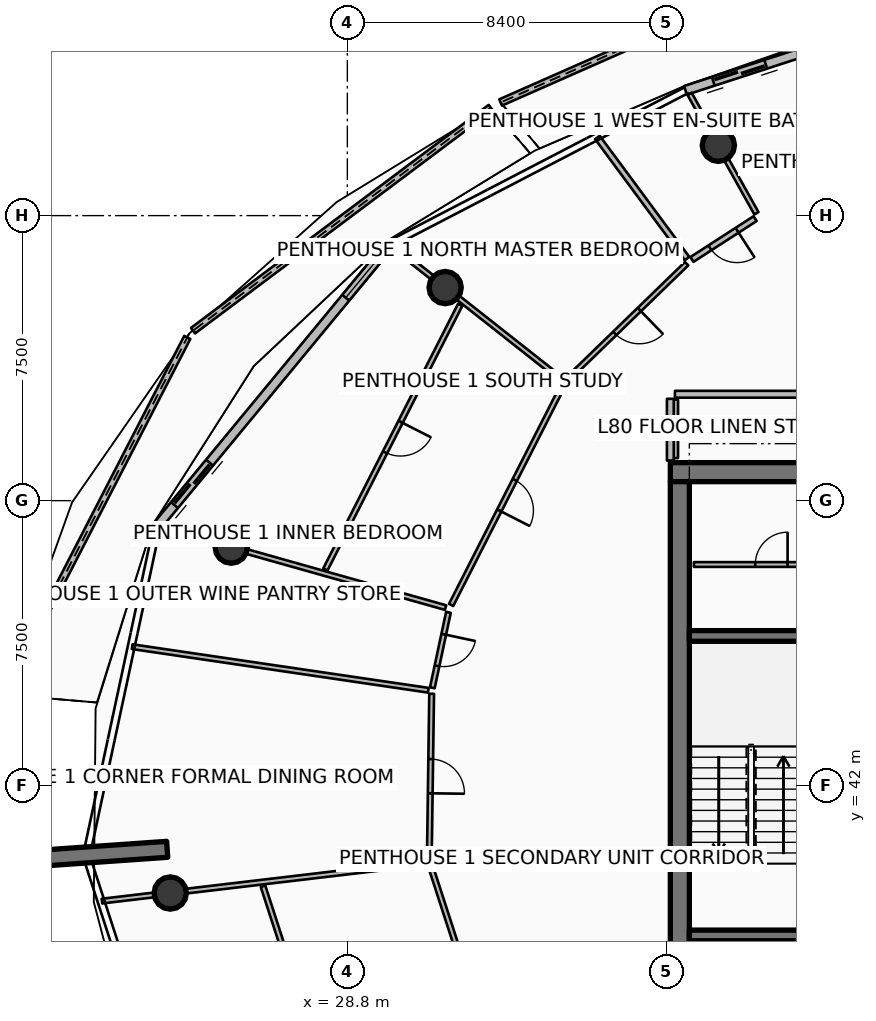
"""IFC4 building model, lengths in metres.
Left out: names, types, materials, properties, quantities, classifications, styles, units other than length and angle.
Written with IfcOpenShell. Run it as: python <this file> out.ifc"""

import sys

from ifc_helpers import new_model, si_unit, direction, frame, frame_2d, origin, origin_2d, place, context, subcontext, project, spatial, polyline, rectangle, circle, outline, extrude, element, fill, save


model = new_model("IFC4")
c1 = context("Model", 3, precision=1e-05, world=origin(), true_north=direction((0.0, 1.0)))
c2 = subcontext(c1, "Body", "Model", "MODEL_VIEW")
j1 = project(units=[si_unit("LENGTHUNIT", "METRE"), si_unit("PLANEANGLEUNIT", "RADIAN")], contexts=[c1])
p1 = place(None, origin())
s1 = spatial("IfcSite", under=j1, at=p1, CompositionType="ELEMENT")
p2 = place(p1, origin())
s2 = spatial("IfcBuilding", under=s1, at=p2, CompositionType="ELEMENT")
p3 = place(p2, frame((0.0, 0.0, 317.9)))
s3 = spatial("IfcBuildingStorey", under=s2, at=p3, CompositionType="ELEMENT", Elevation=317.9)
p4 = place(p3, frame((37.3, 50.25, 0.0), z_axis=(0.0, 0.0, 1.0), x_axis=(1.0, 0.0, 0.0)))
e1 = element("IfcWall", 1, at=p4, inside=s3, PredefinedType="SHEAR", context=c2, shape_type="SweptSolid", body=[
    extrude(rectangle(XDim=9.6, YDim=0.5, at=frame_2d((4.8, 0.0))), origin(), (0.0, 0.0, 1.0), 4.2),
])
p5 = place(p3, frame((37.55, 34.0, 0.0), z_axis=(0.0, 0.0, 1.0), x_axis=(0.0, 1.0, 0.0)))
e2 = element("IfcWall", 2, at=p5, inside=s3, PredefinedType="SHEAR", context=c2, shape_type="SweptSolid", body=[
    extrude(rectangle(XDim=16.0, YDim=0.5, at=frame_2d((8.0, 0.0))), origin(), (0.0, 0.0, 1.0), 4.2),
])
for number, where, z_axis, x_axis in (
    (3, (37.8, 38.06, 0.0), (0.0, 0.0, 1.0), (1.0, 0.0, 0.0)),
    (4, (37.8, 45.94, 0.0), (0.0, 0.0, 1.0), (1.0, 0.0, 0.0)),
):
    element("IfcWall", number, at=place(p3, frame(where, z_axis=z_axis, x_axis=x_axis)), inside=s3, PredefinedType="SHEAR", context=c2, shape_type="SweptSolid", body=[
        extrude(rectangle(XDim=3.5, YDim=0.28, at=frame_2d((1.75, 0.0))), origin(), (0.0, 0.0, 1.0), 4.2),
    ])
p6 = place(p3, frame((24.059, 40.326, 0.0), z_axis=(0.0, 0.0, 1.0), x_axis=(-0.997564163539, -0.069754853754, 0.0)))
e5 = element("IfcWall", 5, at=p6, inside=s3, PredefinedType="SOLIDWALL", context=c2, shape_type="SweptSolid", body=[
    extrude(rectangle(XDim=3.5, YDim=0.42, at=frame_2d((1.75, 0.0))), origin(), (0.0, 0.0, 1.0), 4.2),
])
for number, where, z_axis, x_axis in (
    (6, (38.563, 58.851, 0.0), (0.0, 0.0, 1.0), (1.0, 0.0, 0.0)),
    (7, (31.374, 55.107, 0.0), (0.0, 0.0, 1.0), (1.0, 0.0, 0.0)),
    (8, (25.744, 48.277, 0.0), (0.0, 0.0, 1.0), (1.0, 0.0, 0.0)),
    (9, (24.14, 39.176, 0.0), (0.0, 0.0, 1.0), (1.0, 0.0, 0.0)),
):
    element("IfcColumn", number, at=place(p3, frame(where, z_axis=z_axis, x_axis=x_axis)), inside=s3, PredefinedType="COLUMN", context=c2, shape_type="SweptSolid", body=[
        extrude(circle(Radius=0.425, at=origin_2d()), origin(), (0.0, 0.0, 1.0), 3.94),
    ])
p7 = place(p3, frame((40.879, 63.529, 0.0), z_axis=(0.0, 0.0, 1.0), x_axis=(-0.914812827608, -0.403878063831, 0.0)))
e10 = element("IfcWall", 10, at=p7, inside=s3, PredefinedType="PARAPET", context=c2, shape_type="SweptSolid", body=[
    extrude(outline(polyline([(0.0, 0.0), (8.793, 0.0), (8.794, 1.12), (4.397, 1.182), (0.0, 1.348), (0.0, 0.0)])), frame((0.0, 0.09, 0.0), z_axis=(0.0, -1.0, 0.0), x_axis=(1.0, 0.0, 0.0)), (0.0, 0.0, 1.0), 0.18),
])
p8 = place(p3, frame((32.573, 59.841, 0.0), z_axis=(0.0, 0.0, 1.0), x_axis=(-0.800350065213, -0.599532962491, 0.0)))
e11 = element("IfcWall", 11, at=p8, inside=s3, PredefinedType="PARAPET", context=c2, shape_type="SweptSolid", body=[
    extrude(outline(polyline([(0.0, 0.0), (9.788, 0.0), (9.788, 1.348), (4.894, 1.182), (0.0, 1.12), (0.0, 0.0)])), frame((0.0, 0.09, 0.0), z_axis=(0.0, -1.0, 0.0), x_axis=(1.0, 0.0, 0.0)), (0.0, 0.0, 1.0), 0.18),
])
p9 = place(p3, frame((24.588, 53.794, 0.0), z_axis=(0.0, 0.0, 1.0), x_axis=(-0.458492338696, -0.888698360163, 0.0)))
e12 = element("IfcWall", 12, at=p9, inside=s3, PredefinedType="PARAPET", context=c2, shape_type="SweptSolid", body=[
    extrude(outline(polyline([(0.0, 0.0), (10.573, 0.0), (10.573, 1.747), (5.287, 1.562), (0.0, 1.348), (0.0, 0.0)])), frame((0.0, 0.09, 0.0), z_axis=(0.0, -1.0, 0.0), x_axis=(1.0, 0.0, 0.0)), (0.0, 0.0, 1.0), 0.18),
])
p10 = place(p3, frame((45.581, 62.857, 0.0), z_axis=(0.0, 0.0, 1.0), x_axis=(-0.951053547111, -0.309026132434, 0.0)))
e13 = element("IfcWall", 13, at=p10, inside=s3, PredefinedType="SOLIDWALL", context=c2, shape_type="SweptSolid", body=[
    extrude(rectangle(XDim=8.289, YDim=0.24, at=frame_2d((4.145, 0.0))), origin(), (0.0, 0.0, 1.0), 2.89),
])
p11 = place(p10, frame((6.069, 0.0, 0.0)))
e14 = element("IfcOpeningElement", 14, at=p11, cuts=e13, PredefinedType="OPENING", context=c2, shape_type="SweptSolid", body=[
    extrude(rectangle(XDim=1.45, YDim=2.15, at=frame_2d((0.725, 1.075))), frame((0.0, 0.13, 0.0), z_axis=(0.0, -1.0, 0.0), x_axis=(1.0, 0.0, 0.0)), (0.0, 0.0, 1.0), 0.26),
])
p12 = place(p10, frame((0.28, 0.0, 0.65)))
e15 = element("IfcOpeningElement", 15, at=p12, cuts=e13, PredefinedType="OPENING", context=c2, shape_type="SweptSolid", body=[
    extrude(rectangle(XDim=1.6, YDim=1.5, at=frame_2d((0.8, 0.75))), frame((0.0, 0.13, 0.0), z_axis=(0.0, -1.0, 0.0), x_axis=(1.0, 0.0, 0.0)), (0.0, 0.0, 1.0), 0.26),
])
p13 = place(p3, frame((29.955, 56.289, 0.0), z_axis=(0.0, 0.0, 1.0), x_axis=(-0.636803612721, -0.771026042897, 0.0)))
e16 = element("IfcWall", 16, at=p13, inside=s3, PredefinedType="SOLIDWALL", context=c2, shape_type="SweptSolid", body=[
    extrude(rectangle(XDim=9.728, YDim=0.24, at=frame_2d((4.864, 0.0))), origin(), (0.0, 0.0, 1.0), 2.89),
])
p14 = place(p13, frame((7.508, 0.0, 0.0)))
e17 = element("IfcOpeningElement", 17, at=p14, cuts=e16, PredefinedType="OPENING", context=c2, shape_type="SweptSolid", body=[
    extrude(rectangle(XDim=1.45, YDim=2.15, at=frame_2d((0.725, 1.075))), frame((0.0, 0.13, 0.0), z_axis=(0.0, -1.0, 0.0), x_axis=(1.0, 0.0, 0.0)), (0.0, 0.0, 1.0), 0.26),
])
p15 = place(p13, frame((0.28, 0.0, 0.65)))
e18 = element("IfcOpeningElement", 18, at=p15, cuts=e16, PredefinedType="OPENING", context=c2, shape_type="SweptSolid", body=[
    extrude(rectangle(XDim=1.6, YDim=1.5, at=frame_2d((0.8, 0.75))), frame((0.0, 0.13, 0.0), z_axis=(0.0, -1.0, 0.0), x_axis=(1.0, 0.0, 0.0)), (0.0, 0.0, 1.0), 0.26),
])
p16 = place(p3, frame((37.92, 47.82, 0.0), z_axis=(0.0, 0.0, 1.0), x_axis=(1.0, 0.0, 0.0)))
e19 = element("IfcWall", 19, at=p16, inside=s3, PredefinedType="PARTITIONING", context=c2, shape_type="SweptSolid", body=[
    extrude(rectangle(XDim=4.08, YDim=0.125, at=frame_2d((2.04, 0.0))), origin(), (0.0, 0.0, 1.0), 3.38),
])
p17 = place(p16, frame((1.615, 0.0, 0.0)))
e20 = element("IfcOpeningElement", 20, at=p17, cuts=e19, PredefinedType="OPENING", context=c2, shape_type="SweptSolid", body=[
    extrude(rectangle(XDim=0.85, YDim=2.06, at=frame_2d((0.425, 1.03))), frame((0.0, 0.073, 0.0), z_axis=(0.0, -1.0, 0.0), x_axis=(1.0, 0.0, 0.0)), (0.0, 0.0, 1.0), 0.145),
])
p18 = place(p3, frame((37.44, 50.62, 0.0), z_axis=(0.0, 0.0, 1.0), x_axis=(0.0, 1.0, 0.0)))
e21 = element("IfcWall", 21, at=p18, inside=s3, PredefinedType="PARTITIONING", context=c2, shape_type="SweptSolid", body=[
    extrude(rectangle(XDim=1.54, YDim=0.125, at=frame_2d((0.77, 0.0))), origin(), (0.0, 0.0, 1.0), 3.38),
])
p19 = place(p3, frame((42.112, 52.3, 0.0), z_axis=(0.0, 0.0, 1.0), x_axis=(-1.0, 0.0, 0.0)))
e22 = element("IfcWall", 22, at=p19, inside=s3, PredefinedType="PARTITIONING", context=c2, shape_type="SweptSolid", body=[
    extrude(rectangle(XDim=4.692, YDim=0.18, at=frame_2d((2.346, 0.0))), origin(), (0.0, 0.0, 1.0), 3.38),
])
p20 = place(p3, frame((37.3, 52.18, 0.0), z_axis=(0.0, 0.0, 1.0), x_axis=(0.0, -1.0, 0.0)))
e23 = element("IfcWall", 23, at=p20, inside=s3, PredefinedType="PARTITIONING", context=c2, shape_type="SweptSolid", body=[
    extrude(rectangle(XDim=1.625, YDim=0.18, at=frame_2d((0.812, 0.0))), origin(), (0.0, 0.0, 1.0), 3.38),
])
p21 = place(p3, frame((39.565, 57.062, 0.0), z_axis=(0.0, 0.0, 1.0), x_axis=(-0.488617828282, 0.872497918556, 0.0)))
e24 = element("IfcWall", 24, at=p21, inside=s3, PredefinedType="PARTITIONING", context=c2, shape_type="SweptSolid", body=[
    extrude(rectangle(XDim=3.599, YDim=0.125, at=frame_2d((1.8, 0.0))), origin(), (0.0, 0.0, 1.0), 3.38),
])
p22 = place(p3, frame((39.53, 56.92, 0.0), z_axis=(0.0, 0.0, 1.0), x_axis=(-0.839824942878, -0.542857315802, 0.0)))
e25 = element("IfcWall", 25, at=p22, inside=s3, PredefinedType="PARTITIONING", context=c2, shape_type="SweptSolid", body=[
    extrude(rectangle(XDim=1.979, YDim=0.15, at=frame_2d((0.989, 0.0))), origin(), (0.0, 0.0, 1.0), 3.38),
])
p23 = place(p22, frame((0.564, 0.0, 0.0)))
e26 = element("IfcOpeningElement", 26, at=p23, cuts=e25, PredefinedType="OPENING", context=c2, shape_type="SweptSolid", body=[
    extrude(rectangle(XDim=0.85, YDim=2.06, at=frame_2d((0.425, 1.03))), frame((0.0, 0.085, 0.0), z_axis=(0.0, -1.0, 0.0), x_axis=(1.0, 0.0, 0.0)), (0.0, 0.0, 1.0), 0.17),
])
p24 = place(p3, frame((37.739, 55.87, 0.0), z_axis=(0.0, 0.0, 1.0), x_axis=(-0.594773749171, 0.803893144203, 0.0)))
e27 = element("IfcWall", 27, at=p24, inside=s3, PredefinedType="PARTITIONING", context=c2, shape_type="SweptSolid", body=[
    extrude(rectangle(XDim=3.964, YDim=0.15, at=frame_2d((1.982, 0.0))), origin(), (0.0, 0.0, 1.0), 3.38),
])
p25 = place(p3, frame((37.728, 55.735, 0.0), z_axis=(0.0, 0.0, 1.0), x_axis=(-0.717843655189, -0.696204342636, 0.0)))
e28 = element("IfcWall", 28, at=p25, inside=s3, PredefinedType="PARTITIONING", context=c2, shape_type="SweptSolid", body=[
    extrude(rectangle(XDim=4.366, YDim=0.125, at=frame_2d((2.183, 0.0))), origin(), (0.0, 0.0, 1.0), 3.38),
])
p26 = place(p25, frame((1.733, 0.0, 0.0)))
e29 = element("IfcOpeningElement", 29, at=p26, cuts=e28, PredefinedType="OPENING", context=c2, shape_type="SweptSolid", body=[
    extrude(rectangle(XDim=0.9, YDim=2.08, at=frame_2d((0.45, 1.04))), frame((0.0, 0.073, 0.0), z_axis=(0.0, -1.0, 0.0), x_axis=(1.0, 0.0, 0.0)), (0.0, 0.0, 1.0), 0.145),
])
p27 = place(p3, frame((34.443, 52.688, 0.0), z_axis=(0.0, 0.0, 1.0), x_axis=(-0.785329715116, 0.61907773224, 0.0)))
e30 = element("IfcWall", 30, at=p27, inside=s3, PredefinedType="PARTITIONING", context=c2, shape_type="SweptSolid", body=[
    extrude(rectangle(XDim=5.73, YDim=0.125, at=frame_2d((2.865, 0.0))), origin(), (0.0, 0.0, 1.0), 3.38),
])
p28 = place(p3, frame((34.472, 52.528, 0.0), z_axis=(0.0, 0.0, 1.0), x_axis=(-0.453985634683, -0.891009003042, 0.0)))
e31 = element("IfcWall", 31, at=p28, inside=s3, PredefinedType="PARTITIONING", context=c2, shape_type="SweptSolid", body=[
    extrude(rectangle(XDim=6.477, YDim=0.125, at=frame_2d((3.238, 0.0))), origin(), (0.0, 0.0, 1.0), 3.38),
])
p29 = place(p28, frame((2.788, 0.0, 0.0)))
e32 = element("IfcOpeningElement", 32, at=p29, cuts=e31, PredefinedType="OPENING", context=c2, shape_type="SweptSolid", body=[
    extrude(rectangle(XDim=0.9, YDim=2.08, at=frame_2d((0.45, 1.04))), frame((0.0, 0.073, 0.0), z_axis=(0.0, -1.0, 0.0), x_axis=(1.0, 0.0, 0.0)), (0.0, 0.0, 1.0), 0.145),
])
p30 = place(p3, frame((31.772, 54.656, 0.0), z_axis=(0.0, 0.0, 1.0), x_axis=(-0.453983318952, -0.891010182946, 0.0)))
e33 = element("IfcWall", 33, at=p30, inside=s3, PredefinedType="PARTITIONING", context=c2, shape_type="SweptSolid", body=[
    extrude(rectangle(XDim=7.818, YDim=0.125, at=frame_2d((3.909, 0.0))), origin(), (0.0, 0.0, 1.0), 3.38),
])
p31 = place(p30, frame((3.459, 0.0, 0.0)))
e34 = element("IfcOpeningElement", 34, at=p31, cuts=e33, PredefinedType="OPENING", context=c2, shape_type="SweptSolid", body=[
    extrude(rectangle(XDim=0.9, YDim=2.08, at=frame_2d((0.45, 1.04))), frame((0.0, 0.073, 0.0), z_axis=(0.0, -1.0, 0.0), x_axis=(1.0, 0.0, 0.0)), (0.0, 0.0, 1.0), 0.145),
])
p32 = place(p3, frame((31.385, 46.686, 0.0), z_axis=(0.0, 0.0, 1.0), x_axis=(-0.962455784847, 0.271438505401, 0.0)))
e35 = element("IfcWall", 35, at=p32, inside=s3, PredefinedType="PARTITIONING", context=c2, shape_type="SweptSolid", body=[
    extrude(rectangle(XDim=7.764, YDim=0.125, at=frame_2d((3.882, 0.0))), origin(), (0.0, 0.0, 1.0), 3.38),
])
p33 = place(p3, frame((30.931, 44.511, 0.0), z_axis=(0.0, 0.0, 1.0), x_axis=(-0.989350078836, 0.145555561584, 0.0)))
e36 = element("IfcWall", 36, at=p33, inside=s3, PredefinedType="PARTITIONING", context=c2, shape_type="SweptSolid", body=[
    extrude(rectangle(XDim=7.877, YDim=0.125, at=frame_2d((3.938, 0.0))), origin(), (0.0, 0.0, 1.0), 3.38),
])
p34 = place(p3, frame((31.46, 46.561, 0.0), z_axis=(0.0, 0.0, 1.0), x_axis=(-0.208871695371, -0.977943052981, 0.0)))
e37 = element("IfcWall", 37, at=p34, inside=s3, PredefinedType="PARTITIONING", context=c2, shape_type="SweptSolid", body=[
    extrude(rectangle(XDim=2.029, YDim=0.125, at=frame_2d((1.015, 0.0))), origin(), (0.0, 0.0, 1.0), 3.38),
])
p35 = place(p34, frame((0.59, 0.0, 0.0)))
e38 = element("IfcOpeningElement", 38, at=p35, cuts=e37, PredefinedType="OPENING", context=c2, shape_type="SweptSolid", body=[
    extrude(rectangle(XDim=0.85, YDim=2.06, at=frame_2d((0.425, 1.03))), frame((0.0, 0.073, 0.0), z_axis=(0.0, -1.0, 0.0), x_axis=(1.0, 0.0, 0.0)), (0.0, 0.0, 1.0), 0.145),
])
p36 = place(p3, frame((31.019, 44.418, 0.0), z_axis=(0.0, 0.0, 1.0), x_axis=(-0.014133062898, -0.999900123279, 0.0)))
e39 = element("IfcWall", 39, at=p36, inside=s3, PredefinedType="PARTITIONING", context=c2, shape_type="SweptSolid", body=[
    extrude(rectangle(XDim=4.336, YDim=0.125, at=frame_2d((2.168, 0.0))), origin(), (0.0, 0.0, 1.0), 3.38),
])
p37 = place(p36, frame((1.718, 0.0, 0.0)))
e40 = element("IfcOpeningElement", 40, at=p37, cuts=e39, PredefinedType="OPENING", context=c2, shape_type="SweptSolid", body=[
    extrude(rectangle(XDim=0.9, YDim=2.08, at=frame_2d((0.45, 1.04))), frame((0.0, 0.073, 0.0), z_axis=(0.0, -1.0, 0.0), x_axis=(1.0, 0.0, 0.0)), (0.0, 0.0, 1.0), 0.145),
])
p38 = place(p3, frame((30.857, 39.971, 0.0), z_axis=(0.0, 0.0, 1.0), x_axis=(-0.993069304007, -0.117530240533, 0.0)))
e41 = element("IfcWall", 41, at=p38, inside=s3, PredefinedType="PARTITIONING", context=c2, shape_type="SweptSolid", body=[
    extrude(rectangle(XDim=8.573, YDim=0.125, at=frame_2d((4.286, 0.0))), origin(), (0.0, 0.0, 1.0), 3.38),
])
p39 = place(p3, frame((30.99, 39.878, 0.0), z_axis=(0.0, 0.0, 1.0), x_axis=(0.309026406972, -0.951053457905, 0.0)))
e42 = element("IfcWall", 42, at=p39, inside=s3, PredefinedType="PARTITIONING", context=c2, shape_type="SweptSolid", body=[
    extrude(rectangle(XDim=6.477, YDim=0.125, at=frame_2d((3.238, 0.0))), origin(), (0.0, 0.0, 1.0), 3.38),
])
p40 = place(p39, frame((2.788, 0.0, 0.0)))
e43 = element("IfcOpeningElement", 43, at=p40, cuts=e42, PredefinedType="OPENING", context=c2, shape_type="SweptSolid", body=[
    extrude(rectangle(XDim=0.9, YDim=2.08, at=frame_2d((0.45, 1.04))), frame((0.0, 0.073, 0.0), z_axis=(0.0, -1.0, 0.0), x_axis=(1.0, 0.0, 0.0)), (0.0, 0.0, 1.0), 0.145),
])
p41 = place(p3, frame((26.581, 39.356, 0.0), z_axis=(0.0, 0.0, 1.0), x_axis=(0.309000666789, -0.951061821294, 0.0)))
e44 = element("IfcWall", 44, at=p41, inside=s3, PredefinedType="PARTITIONING", context=c2, shape_type="SweptSolid", body=[
    extrude(rectangle(XDim=8.209, YDim=0.125, at=frame_2d((4.104, 0.0))), origin(), (0.0, 0.0, 1.0), 3.38),
])
p42 = place(p41, frame((3.655, 0.0, 0.0)))
e45 = element("IfcOpeningElement", 45, at=p42, cuts=e44, PredefinedType="OPENING", context=c2, shape_type="SweptSolid", body=[
    extrude(rectangle(XDim=0.9, YDim=2.08, at=frame_2d((0.45, 1.04))), frame((0.0, 0.073, 0.0), z_axis=(0.0, -1.0, 0.0), x_axis=(1.0, 0.0, 0.0)), (0.0, 0.0, 1.0), 0.145),
])
p43 = place(p11, origin())
e46 = element("IfcDoor", 46, at=p43, inside=s3, OperationType="DOUBLE_DOOR_SLIDING", PredefinedType="DOOR", context=c2, shape_type="SweptSolid", body=[
    extrude(rectangle(XDim=1.45, YDim=2.15, at=frame_2d((0.725, 1.075))), frame((0.0, 0.025, 0.0), z_axis=(0.0, -1.0, 0.0), x_axis=(1.0, 0.0, 0.0)), (0.0, 0.0, 1.0), 0.05),
])
fill(e14, e46)
p44 = place(p14, origin())
e47 = element("IfcDoor", 47, at=p44, inside=s3, OperationType="DOUBLE_DOOR_SLIDING", PredefinedType="DOOR", context=c2, shape_type="SweptSolid", body=[
    extrude(rectangle(XDim=1.45, YDim=2.15, at=frame_2d((0.725, 1.075))), frame((0.0, 0.025, 0.0), z_axis=(0.0, -1.0, 0.0), x_axis=(1.0, 0.0, 0.0)), (0.0, 0.0, 1.0), 0.05),
])
fill(e17, e47)
p45 = place(p15, origin())
e48 = element("IfcWindow", 48, at=p45, inside=s3, PartitioningType="SINGLE_PANEL", PredefinedType="WINDOW", context=c2, shape_type="SweptSolid", body=[
    extrude(rectangle(XDim=1.6, YDim=1.5, at=frame_2d((0.8, 0.75))), frame((0.0, 0.03, 0.0), z_axis=(0.0, -1.0, 0.0), x_axis=(1.0, 0.0, 0.0)), (0.0, 0.0, 1.0), 0.06),
])
fill(e18, e48)
p46 = place(p17, origin())
e49 = element("IfcDoor", 49, at=p46, inside=s3, OperationType="SINGLE_SWING_RIGHT", PredefinedType="DOOR", context=c2, shape_type="SweptSolid", body=[
    extrude(rectangle(XDim=0.85, YDim=2.06, at=frame_2d((0.425, 1.03))), frame((0.0, 0.025, 0.0), z_axis=(0.0, -1.0, 0.0), x_axis=(1.0, 0.0, 0.0)), (0.0, 0.0, 1.0), 0.05),
])
fill(e20, e49)
p47 = place(p23, origin())
e50 = element("IfcDoor", 50, at=p47, inside=s3, OperationType="SINGLE_SWING_LEFT", PredefinedType="DOOR", context=c2, shape_type="SweptSolid", body=[
    extrude(rectangle(XDim=0.85, YDim=2.06, at=frame_2d((0.425, 1.03))), frame((0.0, 0.025, 0.0), z_axis=(0.0, -1.0, 0.0), x_axis=(1.0, 0.0, 0.0)), (0.0, 0.0, 1.0), 0.05),
])
fill(e26, e50)
p48 = place(p26, origin())
e51 = element("IfcDoor", 51, at=p48, inside=s3, OperationType="SINGLE_SWING_LEFT", PredefinedType="DOOR", context=c2, shape_type="SweptSolid", body=[
    extrude(rectangle(XDim=0.9, YDim=2.08, at=frame_2d((0.45, 1.04))), frame((0.0, 0.025, 0.0), z_axis=(0.0, -1.0, 0.0), x_axis=(1.0, 0.0, 0.0)), (0.0, 0.0, 1.0), 0.05),
])
fill(e29, e51)
p49 = place(p29, origin())
e52 = element("IfcDoor", 52, at=p49, inside=s3, OperationType="SINGLE_SWING_RIGHT", PredefinedType="DOOR", context=c2, shape_type="SweptSolid", body=[
    extrude(rectangle(XDim=0.9, YDim=2.08, at=frame_2d((0.45, 1.04))), frame((0.0, 0.025, 0.0), z_axis=(0.0, -1.0, 0.0), x_axis=(1.0, 0.0, 0.0)), (0.0, 0.0, 1.0), 0.05),
])
fill(e32, e52)
p50 = place(p31, origin())
e53 = element("IfcDoor", 53, at=p50, inside=s3, OperationType="SINGLE_SWING_LEFT", PredefinedType="DOOR", context=c2, shape_type="SweptSolid", body=[
    extrude(rectangle(XDim=0.9, YDim=2.08, at=frame_2d((0.45, 1.04))), frame((0.0, 0.025, 0.0), z_axis=(0.0, -1.0, 0.0), x_axis=(1.0, 0.0, 0.0)), (0.0, 0.0, 1.0), 0.05),
])
fill(e34, e53)
p51 = place(p35, origin())
e54 = element("IfcDoor", 54, at=p51, inside=s3, OperationType="SINGLE_SWING_LEFT", PredefinedType="DOOR", context=c2, shape_type="SweptSolid", body=[
    extrude(rectangle(XDim=0.85, YDim=2.06, at=frame_2d((0.425, 1.03))), frame((0.0, 0.025, 0.0), z_axis=(0.0, -1.0, 0.0), x_axis=(1.0, 0.0, 0.0)), (0.0, 0.0, 1.0), 0.05),
])
fill(e38, e54)
p52 = place(p37, origin())
e55 = element("IfcDoor", 55, at=p52, inside=s3, OperationType="SINGLE_SWING_RIGHT", PredefinedType="DOOR", context=c2, shape_type="SweptSolid", body=[
    extrude(rectangle(XDim=0.9, YDim=2.08, at=frame_2d((0.45, 1.04))), frame((0.0, 0.025, 0.0), z_axis=(0.0, -1.0, 0.0), x_axis=(1.0, 0.0, 0.0)), (0.0, 0.0, 1.0), 0.05),
])
fill(e40, e55)
save(model, sys.argv[1])
